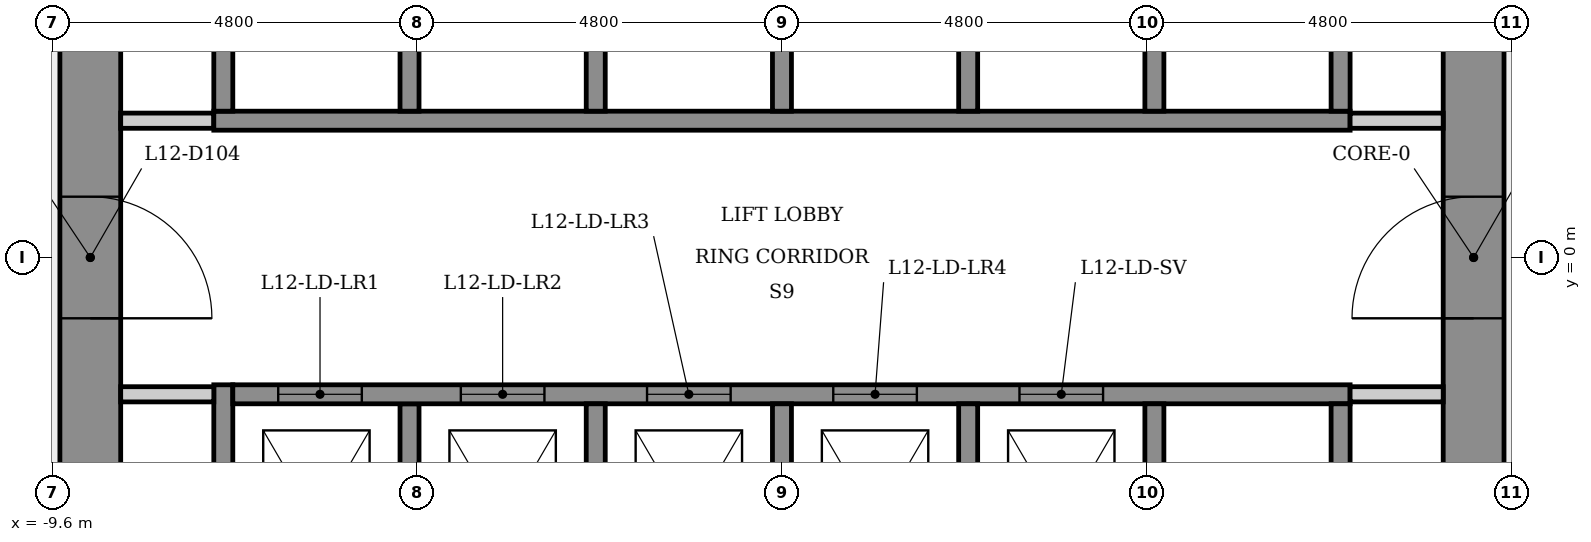
"""IFC4 building model, lengths in metres.
Left out: names, types, materials, properties, quantities, classifications, styles, units other than length and angle.
Written with IfcOpenShell. Run it as: python <this file> out.ifc"""

import sys

from ifc_helpers import new_model, si_unit, direction, frame, frame_2d, origin, place, context, subcontext, project, spatial, rectangle, extrude, element, fill, save


model = new_model("IFC4")
c1 = context("Model", 3, precision=1e-05, world=origin(), true_north=direction((0.0, 1.0)))
c2 = subcontext(c1, "Body", "Model", "MODEL_VIEW")
j1 = project(units=[si_unit("LENGTHUNIT", "METRE"), si_unit("PLANEANGLEUNIT", "RADIAN")], contexts=[c1])
p1 = place(None, origin())
s1 = spatial("IfcSite", under=j1, at=p1, CompositionType="ELEMENT")
p2 = place(p1, origin())
s2 = spatial("IfcBuilding", under=s1, at=p2, CompositionType="ELEMENT")
p3 = place(p2, frame((0.0, 0.0, 49.3)))
s3 = spatial("IfcBuildingStorey", under=s2, at=p3, CompositionType="ELEMENT", Elevation=49.3)
p4 = place(p3, frame((9.1, -5.485, 0.0), z_axis=(0.0, 0.0, 1.0), x_axis=(0.0, 1.0, 0.0)))
e1 = element("IfcWall", 1, at=p4, inside=s3, PredefinedType="SHEAR", context=c2, shape_type="SweptSolid", body=[
    extrude(rectangle(XDim=10.97, YDim=0.8, at=frame_2d((5.485, 0.0))), origin(), (0.0, 0.0, 1.0), 3.4),
])
p5 = place(p4, frame((4.685, 0.0, 0.0)))
e2 = element("IfcOpeningElement", 2, at=p5, cuts=e1, PredefinedType="OPENING", context=c2, shape_type="SweptSolid", body=[
    extrude(rectangle(XDim=1.6, YDim=2.1, at=frame_2d((0.8, 1.05))), frame((0.0, 0.41, 0.0), z_axis=(0.0, -1.0, 0.0), x_axis=(1.0, 0.0, 0.0)), (0.0, 0.0, 1.0), 0.82),
])
p6 = place(p3, frame((-9.1, 5.485, 0.0), z_axis=(0.0, 0.0, 1.0), x_axis=(0.0, -1.0, 0.0)))
e3 = element("IfcWall", 3, at=p6, inside=s3, PredefinedType="SHEAR", context=c2, shape_type="SweptSolid", body=[
    extrude(rectangle(XDim=10.97, YDim=0.8, at=frame_2d((5.485, 0.0))), origin(), (0.0, 0.0, 1.0), 3.4),
])
p7 = place(p6, frame((4.685, 0.0, 0.0)))
e4 = element("IfcOpeningElement", 4, at=p7, cuts=e3, PredefinedType="OPENING", context=c2, shape_type="SweptSolid", body=[
    extrude(rectangle(XDim=1.6, YDim=2.1, at=frame_2d((0.8, 1.05))), frame((0.0, 0.41, 0.0), z_axis=(0.0, -1.0, 0.0), x_axis=(1.0, 0.0, 0.0)), (0.0, 0.0, 1.0), 0.82),
])
p8 = place(p3, frame((-8.7, 1.8, 0.0), z_axis=(0.0, 0.0, 1.0), x_axis=(1.0, 0.0, 0.0)))
e5 = element("IfcWall", 5, at=p8, inside=s3, PredefinedType="PARTITIONING", context=c2, shape_type="SweptSolid", body=[
    extrude(rectangle(XDim=1.225, YDim=0.2, at=frame_2d((0.613, 0.0))), origin(), (0.0, 0.0, 1.0), 3.05),
])
p9 = place(p3, frame((-7.475, 1.8, 0.0), z_axis=(0.0, 0.0, 1.0), x_axis=(1.0, 0.0, 0.0)))
e6 = element("IfcWall", 6, at=p9, inside=s3, PredefinedType="SHEAR", context=c2, shape_type="SweptSolid", body=[
    extrude(rectangle(XDim=14.95, YDim=0.25, at=frame_2d((7.475, 0.0))), origin(), (0.0, 0.0, 1.0), 3.05),
])
p10 = place(p3, frame((-7.35, -5.73, 0.0), z_axis=(0.0, 0.0, 1.0), x_axis=(0.0, 1.0, 0.0)))
e7 = element("IfcWall", 7, at=p10, inside=s3, PredefinedType="SHEAR", context=c2, shape_type="SweptSolid", body=[
    extrude(rectangle(XDim=4.055, YDim=0.25, at=frame_2d((2.028, 0.0))), origin(), (0.0, 0.0, 1.0), 3.05),
])
p11 = place(p3, frame((-7.35, 1.925, 0.0), z_axis=(0.0, 0.0, 1.0), x_axis=(0.0, 1.0, 0.0)))
e8 = element("IfcWall", 8, at=p11, inside=s3, PredefinedType="SHEAR", context=c2, shape_type="SweptSolid", body=[
    extrude(rectangle(XDim=3.805, YDim=0.25, at=frame_2d((1.903, 0.0))), origin(), (0.0, 0.0, 1.0), 3.05),
])
p12 = place(p3, frame((-7.475, -1.8, 0.0), z_axis=(0.0, 0.0, 1.0), x_axis=(-1.0, 0.0, 0.0)))
e9 = element("IfcWall", 9, at=p12, inside=s3, PredefinedType="PARTITIONING", context=c2, shape_type="SweptSolid", body=[
    extrude(rectangle(XDim=1.225, YDim=0.2, at=frame_2d((0.613, 0.0))), origin(), (0.0, 0.0, 1.0), 3.05),
])
for number, where, z_axis, x_axis in (
    (10, (-4.9, -1.925, 0.0), (0.0, 0.0, 1.0), (0.0, -1.0, 0.0)),
    (11, (-4.9, 5.025, 0.0), (0.0, 0.0, 1.0), (0.0, -1.0, 0.0)),
):
    element("IfcWall", number, at=place(p3, frame(where, z_axis=z_axis, x_axis=x_axis)), inside=s3, PredefinedType="SHEAR", context=c2, shape_type="SweptSolid", body=[
        extrude(rectangle(XDim=3.1, YDim=0.25, at=frame_2d((1.55, 0.0))), origin(), (0.0, 0.0, 1.0), 3.4),
    ])
p13 = place(p3, frame((-7.225, -1.8, 0.0), z_axis=(0.0, 0.0, 1.0), x_axis=(1.0, 0.0, 0.0)))
e12 = element("IfcWall", 12, at=p13, inside=s3, PredefinedType="SHEAR", context=c2, shape_type="SweptSolid", body=[
    extrude(rectangle(XDim=14.7, YDim=0.25, at=frame_2d((7.35, 0.0))), origin(), (0.0, 0.0, 1.0), 3.05),
])
p14 = place(p13, frame((0.597, 0.0, 0.0)))
e13 = element("IfcOpeningElement", 13, at=p14, cuts=e12, PredefinedType="OPENING", context=c2, shape_type="SweptSolid", body=[
    extrude(rectangle(XDim=1.1, YDim=2.1, at=frame_2d((0.55, 1.05))), frame((0.0, 0.135, 0.0), z_axis=(0.0, -1.0, 0.0), x_axis=(1.0, 0.0, 0.0)), (0.0, 0.0, 1.0), 0.27),
])
p15 = place(p13, frame((3.0, 0.0, 0.0)))
e14 = element("IfcOpeningElement", 14, at=p15, cuts=e12, PredefinedType="OPENING", context=c2, shape_type="SweptSolid", body=[
    extrude(rectangle(XDim=1.1, YDim=2.1, at=frame_2d((0.55, 1.05))), frame((0.0, 0.135, 0.0), z_axis=(0.0, -1.0, 0.0), x_axis=(1.0, 0.0, 0.0)), (0.0, 0.0, 1.0), 0.27),
])
p16 = place(p13, frame((5.45, 0.0, 0.0)))
e15 = element("IfcOpeningElement", 15, at=p16, cuts=e12, PredefinedType="OPENING", context=c2, shape_type="SweptSolid", body=[
    extrude(rectangle(XDim=1.1, YDim=2.1, at=frame_2d((0.55, 1.05))), frame((0.0, 0.135, 0.0), z_axis=(0.0, -1.0, 0.0), x_axis=(1.0, 0.0, 0.0)), (0.0, 0.0, 1.0), 0.27),
])
p17 = place(p13, frame((7.9, 0.0, 0.0)))
e16 = element("IfcOpeningElement", 16, at=p17, cuts=e12, PredefinedType="OPENING", context=c2, shape_type="SweptSolid", body=[
    extrude(rectangle(XDim=1.1, YDim=2.1, at=frame_2d((0.55, 1.05))), frame((0.0, 0.135, 0.0), z_axis=(0.0, -1.0, 0.0), x_axis=(1.0, 0.0, 0.0)), (0.0, 0.0, 1.0), 0.27),
])
p18 = place(p13, frame((10.35, 0.0, 0.0)))
e17 = element("IfcOpeningElement", 17, at=p18, cuts=e12, PredefinedType="OPENING", context=c2, shape_type="SweptSolid", body=[
    extrude(rectangle(XDim=1.1, YDim=2.1, at=frame_2d((0.55, 1.05))), frame((0.0, 0.135, 0.0), z_axis=(0.0, -1.0, 0.0), x_axis=(1.0, 0.0, 0.0)), (0.0, 0.0, 1.0), 0.27),
])
for number, where, z_axis, x_axis in (
    (18, (-2.45, -1.925, 0.0), (0.0, 0.0, 1.0), (0.0, -1.0, 0.0)),
    (19, (-2.45, 5.025, 0.0), (0.0, 0.0, 1.0), (0.0, -1.0, 0.0)),
    (20, (0.0, -1.925, 0.0), (0.0, 0.0, 1.0), (0.0, -1.0, 0.0)),
    (21, (0.0, 5.025, 0.0), (0.0, 0.0, 1.0), (0.0, -1.0, 0.0)),
    (22, (2.45, -1.925, 0.0), (0.0, 0.0, 1.0), (0.0, -1.0, 0.0)),
    (23, (2.45, 5.025, 0.0), (0.0, 0.0, 1.0), (0.0, -1.0, 0.0)),
    (24, (4.9, -1.925, 0.0), (0.0, 0.0, 1.0), (0.0, -1.0, 0.0)),
    (25, (4.9, 5.025, 0.0), (0.0, 0.0, 1.0), (0.0, -1.0, 0.0)),
):
    element("IfcWall", number, at=place(p3, frame(where, z_axis=z_axis, x_axis=x_axis)), inside=s3, PredefinedType="SHEAR", context=c2, shape_type="SweptSolid", body=[
        extrude(rectangle(XDim=3.1, YDim=0.25, at=frame_2d((1.55, 0.0))), origin(), (0.0, 0.0, 1.0), 3.4),
    ])
p19 = place(p3, frame((7.475, 1.8, 0.0), z_axis=(0.0, 0.0, 1.0), x_axis=(1.0, 0.0, 0.0)))
e26 = element("IfcWall", 26, at=p19, inside=s3, PredefinedType="PARTITIONING", context=c2, shape_type="SweptSolid", body=[
    extrude(rectangle(XDim=1.225, YDim=0.2, at=frame_2d((0.613, 0.0))), origin(), (0.0, 0.0, 1.0), 3.05),
])
for number, where, z_axis, x_axis in (
    (27, (7.35, -1.925, 0.0), (0.0, 0.0, 1.0), (0.0, -1.0, 0.0)),
    (28, (7.35, 5.73, 0.0), (0.0, 0.0, 1.0), (0.0, -1.0, 0.0)),
):
    element("IfcWall", number, at=place(p3, frame(where, z_axis=z_axis, x_axis=x_axis)), inside=s3, PredefinedType="SHEAR", context=c2, shape_type="SweptSolid", body=[
        extrude(rectangle(XDim=3.805, YDim=0.25, at=frame_2d((1.903, 0.0))), origin(), (0.0, 0.0, 1.0), 3.05),
    ])
p20 = place(p3, frame((8.7, -1.8, 0.0), z_axis=(0.0, 0.0, 1.0), x_axis=(-1.0, 0.0, 0.0)))
e29 = element("IfcWall", 29, at=p20, inside=s3, PredefinedType="PARTITIONING", context=c2, shape_type="SweptSolid", body=[
    extrude(rectangle(XDim=1.225, YDim=0.2, at=frame_2d((0.613, 0.0))), origin(), (0.0, 0.0, 1.0), 3.05),
])
p21 = place(p14, origin())
e30 = element("IfcDoor", 30, at=p21, inside=s3, OperationType="SLIDING_TO_LEFT", PredefinedType="DOOR", context=c2, shape_type="SweptSolid", body=[
    extrude(rectangle(XDim=1.1, YDim=2.1, at=frame_2d((0.55, 1.05))), frame((0.0, 0.025, 0.0), z_axis=(0.0, -1.0, 0.0), x_axis=(1.0, 0.0, 0.0)), (0.0, 0.0, 1.0), 0.05),
])
fill(e13, e30)
p22 = place(p15, origin())
e31 = element("IfcDoor", 31, at=p22, inside=s3, OperationType="SLIDING_TO_LEFT", PredefinedType="DOOR", context=c2, shape_type="SweptSolid", body=[
    extrude(rectangle(XDim=1.1, YDim=2.1, at=frame_2d((0.55, 1.05))), frame((0.0, 0.025, 0.0), z_axis=(0.0, -1.0, 0.0), x_axis=(1.0, 0.0, 0.0)), (0.0, 0.0, 1.0), 0.05),
])
fill(e14, e31)
p23 = place(p16, origin())
e32 = element("IfcDoor", 32, at=p23, inside=s3, OperationType="SLIDING_TO_LEFT", PredefinedType="DOOR", context=c2, shape_type="SweptSolid", body=[
    extrude(rectangle(XDim=1.1, YDim=2.1, at=frame_2d((0.55, 1.05))), frame((0.0, 0.025, 0.0), z_axis=(0.0, -1.0, 0.0), x_axis=(1.0, 0.0, 0.0)), (0.0, 0.0, 1.0), 0.05),
])
fill(e15, e32)
p24 = place(p17, origin())
e33 = element("IfcDoor", 33, at=p24, inside=s3, OperationType="SLIDING_TO_LEFT", PredefinedType="DOOR", context=c2, shape_type="SweptSolid", body=[
    extrude(rectangle(XDim=1.1, YDim=2.1, at=frame_2d((0.55, 1.05))), frame((0.0, 0.025, 0.0), z_axis=(0.0, -1.0, 0.0), x_axis=(1.0, 0.0, 0.0)), (0.0, 0.0, 1.0), 0.05),
])
fill(e16, e33)
p25 = place(p18, origin())
e34 = element("IfcDoor", 34, at=p25, inside=s3, OperationType="SLIDING_TO_LEFT", PredefinedType="DOOR", context=c2, shape_type="SweptSolid", body=[
    extrude(rectangle(XDim=1.1, YDim=2.1, at=frame_2d((0.55, 1.05))), frame((0.0, 0.025, 0.0), z_axis=(0.0, -1.0, 0.0), x_axis=(1.0, 0.0, 0.0)), (0.0, 0.0, 1.0), 0.05),
])
fill(e17, e34)
p26 = place(p5, origin())
e35 = element("IfcDoor", 35, at=p26, inside=s3, OperationType="SINGLE_SWING_LEFT", PredefinedType="DOOR", context=c2, shape_type="SweptSolid", body=[
    extrude(rectangle(XDim=1.6, YDim=2.1, at=frame_2d((0.8, 1.05))), frame((0.0, 0.025, 0.0), z_axis=(0.0, -1.0, 0.0), x_axis=(1.0, 0.0, 0.0)), (0.0, 0.0, 1.0), 0.05),
])
fill(e2, e35)
p27 = place(p7, origin())
e36 = element("IfcDoor", 36, at=p27, inside=s3, OperationType="SINGLE_SWING_RIGHT", PredefinedType="DOOR", context=c2, shape_type="SweptSolid", body=[
    extrude(rectangle(XDim=1.6, YDim=2.1, at=frame_2d((0.8, 1.05))), frame((0.0, 0.025, 0.0), z_axis=(0.0, -1.0, 0.0), x_axis=(1.0, 0.0, 0.0)), (0.0, 0.0, 1.0), 0.05),
])
fill(e4, e36)
save(model, sys.argv[1])
